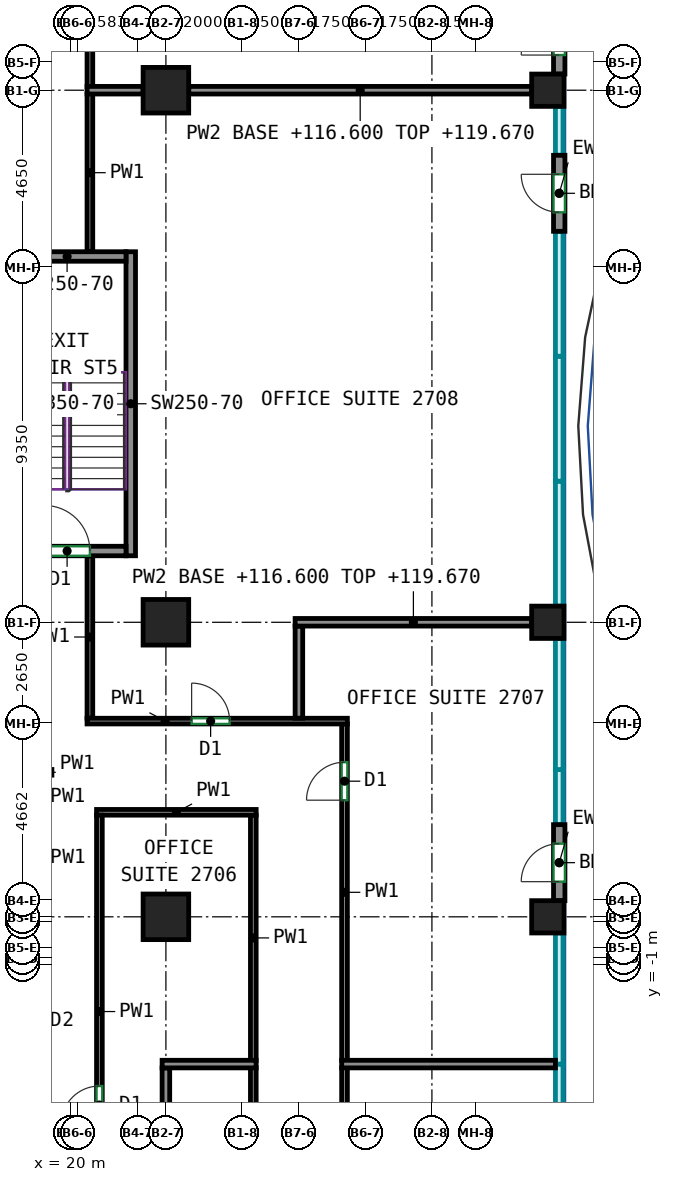
"""IFC4 building model, lengths in metres.
Left out: names, types, materials, properties, quantities, classifications, styles, units other than length and angle.
Written with IfcOpenShell. Run it as: python <this file> out.ifc"""

import sys

from ifc_helpers import new_model, si_unit, direction, frame, frame_2d, origin, origin_2d, place, context, subcontext, project, spatial, rectangle, extrude, source, transform, mapped, element, fill, save


model = new_model("IFC4")
c1 = context("Model", 3, precision=1e-05, world=origin(), true_north=direction((0.0, 1.0)))
c2 = subcontext(c1, "Body", "Model", "MODEL_VIEW")
j1 = project(units=[si_unit("LENGTHUNIT", "METRE"), si_unit("PLANEANGLEUNIT", "RADIAN")], contexts=[c1])
p1 = place(None, origin())
s1 = spatial("IfcSite", under=j1, at=p1, CompositionType="ELEMENT")
p2 = place(p1, origin())
s2 = spatial("IfcBuilding", under=s1, at=p2, CompositionType="ELEMENT")
p3 = place(p2, frame((0.0, 0.0, 116.6)))
s3 = spatial("IfcBuildingStorey", under=s2, at=p3, CompositionType="ELEMENT", Elevation=116.6)
m1 = source(origin(), c2, "Body", "SweptSolid", [
    extrude(rectangle(XDim=1.2, YDim=1.2, at=origin_2d()), origin(), (0.0, 0.0, 1.0), 3.72),
])
for number, where, z_axis, x_axis in (
    (1, (22.5, 0.25, 0.0), (0.0, 0.0, 1.0), (1.0, 0.0, 0.0)),
    (2, (22.5, 8.0, 0.0), (0.0, 0.0, 1.0), (1.0, 0.0, 0.0)),
    (3, (22.5, 22.0, 0.0), (0.0, 0.0, 1.0), (1.0, 0.0, 0.0)),
):
    element("IfcColumn", number, at=place(p3, frame(where, z_axis=z_axis, x_axis=x_axis)), inside=s3, PredefinedType="COLUMN", context=c2, shape_type="MappedRepresentation", body=[
        mapped(m1, transform((0.0, 0.0, 0.0))),
    ])
m2 = source(origin(), c2, "Body", "SweptSolid", [
    extrude(rectangle(XDim=0.85, YDim=0.85, at=origin_2d()), origin(), (0.0, 0.0, 1.0), 3.72),
])
for number, where, z_axis, x_axis in (
    (4, (32.55, 0.25, 0.0), (0.0, 0.0, 1.0), (1.0, 0.0, 0.0)),
    (5, (32.55, 8.0, 0.0), (0.0, 0.0, 1.0), (1.0, 0.0, 0.0)),
    (6, (32.55, 22.0, 0.0), (0.0, 0.0, 1.0), (1.0, 0.0, 0.0)),
):
    element("IfcColumn", number, at=place(p3, frame(where, z_axis=z_axis, x_axis=x_axis)), inside=s3, PredefinedType="COLUMN", context=c2, shape_type="MappedRepresentation", body=[
        mapped(m2, transform((0.0, 0.0, 0.0))),
    ])
m3 = source(origin(), c2, "Body", "SweptSolid", [
    extrude(rectangle(XDim=8.0, YDim=0.25, at=frame_2d((4.0, 0.0))), origin(), (0.0, 0.0, 1.0), 3.72),
])
p4 = place(p3, frame((21.575, 9.75, 0.0), z_axis=(0.0, 0.0, 1.0), x_axis=(0.0, 1.0, 0.0)))
e7 = element("IfcWall", 7, at=p4, inside=s3, PredefinedType="SHEAR", context=c2, shape_type="MappedRepresentation", body=[
    mapped(m3, transform((0.0, 0.0, 0.0))),
])
m4 = source(origin(), c2, "Body", "SweptSolid", [
    extrude(rectangle(XDim=3.1, YDim=0.25, at=frame_2d((1.55, 0.0))), origin(), (0.0, 0.0, 1.0), 3.72),
])
p5 = place(p3, frame((18.35, 9.875, 0.0), z_axis=(0.0, 0.0, 1.0), x_axis=(1.0, 0.0, 0.0)))
e8 = element("IfcWall", 8, at=p5, inside=s3, PredefinedType="SHEAR", context=c2, shape_type="MappedRepresentation", body=[
    mapped(m4, transform((0.0, 0.0, 0.0))),
])
p6 = place(p5, frame((0.95, 0.0, 0.0)))
e9 = element("IfcOpeningElement", 9, at=p6, cuts=e8, PredefinedType="OPENING", context=c2, shape_type="SweptSolid", body=[
    extrude(rectangle(XDim=1.2, YDim=2.1, at=frame_2d((0.6, 1.05))), frame((0.0, 0.135, 0.0), z_axis=(0.0, -1.0, 0.0), x_axis=(1.0, 0.0, 0.0)), (0.0, 0.0, 1.0), 0.27),
])
p7 = place(p3, frame((18.35, 17.625, 0.0), z_axis=(0.0, 0.0, 1.0), x_axis=(1.0, 0.0, 0.0)))
e10 = element("IfcWall", 10, at=p7, inside=s3, PredefinedType="SHEAR", context=c2, shape_type="MappedRepresentation", body=[
    mapped(m4, transform((0.0, 0.0, 0.0))),
])
m5 = source(origin(), c2, "Body", "SweptSolid", [
    extrude(rectangle(XDim=2.0, YDim=0.3, at=frame_2d((1.0, 0.0))), origin(), (0.0, 0.0, 1.0), 3.72),
])
p8 = place(p3, frame((32.85, 0.675, 0.0), z_axis=(0.0, 0.0, 1.0), x_axis=(0.0, 1.0, 0.0)))
e11 = element("IfcWall", 11, at=p8, inside=s3, PredefinedType="SOLIDWALL", context=c2, shape_type="MappedRepresentation", body=[
    mapped(m5, transform((0.0, 0.0, 0.0))),
])
p9 = place(p8, frame((0.5, 0.0, 0.0)))
e12 = element("IfcOpeningElement", 12, at=p9, cuts=e11, PredefinedType="OPENING", context=c2, shape_type="SweptSolid", body=[
    extrude(rectangle(XDim=1.0, YDim=2.1, at=frame_2d((0.5, 1.05))), frame((0.0, 0.16, 0.0), z_axis=(0.0, -1.0, 0.0), x_axis=(1.0, 0.0, 0.0)), (0.0, 0.0, 1.0), 0.32),
])
p10 = place(p3, frame((32.85, 18.288, 0.0), z_axis=(0.0, 0.0, 1.0), x_axis=(0.0, 1.0, 0.0)))
e13 = element("IfcWall", 13, at=p10, inside=s3, PredefinedType="SOLIDWALL", context=c2, shape_type="MappedRepresentation", body=[
    mapped(m5, transform((0.0, 0.0, 0.0))),
])
p11 = place(p10, frame((0.5, 0.0, 0.0)))
e14 = element("IfcOpeningElement", 14, at=p11, cuts=e13, PredefinedType="OPENING", context=c2, shape_type="SweptSolid", body=[
    extrude(rectangle(XDim=1.0, YDim=2.1, at=frame_2d((0.5, 1.05))), frame((0.0, 0.16, 0.0), z_axis=(0.0, -1.0, 0.0), x_axis=(1.0, 0.0, 0.0)), (0.0, 0.0, 1.0), 0.32),
])
p12 = place(p3, frame((32.85, 22.425, 0.0), z_axis=(0.0, 0.0, 1.0), x_axis=(0.0, 1.0, 0.0)))
e15 = element("IfcWall", 15, at=p12, inside=s3, PredefinedType="SOLIDWALL", context=c2, shape_type="MappedRepresentation", body=[
    mapped(m5, transform((0.0, 0.0, 0.0))),
])
p13 = place(p12, frame((0.5, 0.0, 0.0)))
e16 = element("IfcOpeningElement", 16, at=p13, cuts=e15, PredefinedType="OPENING", context=c2, shape_type="SweptSolid", body=[
    extrude(rectangle(XDim=1.0, YDim=2.1, at=frame_2d((0.5, 1.05))), frame((0.0, 0.16, 0.0), z_axis=(0.0, -1.0, 0.0), x_axis=(1.0, 0.0, 0.0)), (0.0, 0.0, 1.0), 0.32),
])
p14 = place(p3, frame((27.2, -19.175, 0.0), z_axis=(0.0, 0.0, 1.0), x_axis=(0.0, 1.0, 0.0)))
e17 = element("IfcWall", 17, at=p14, inside=s3, PredefinedType="PARTITIONING", context=c2, shape_type="SweptSolid", body=[
    extrude(rectangle(XDim=15.46, YDim=0.15, at=frame_2d((7.73, 0.0))), origin(), (0.0, 0.0, 1.0), 3.72),
])
p15 = place(p14, frame((3.514, 0.0, 0.0)))
e18 = element("IfcOpeningElement", 18, at=p15, cuts=e17, PredefinedType="OPENING", context=c2, shape_type="SweptSolid", body=[
    extrude(rectangle(XDim=1.0, YDim=2.1, at=frame_2d((0.5, 1.05))), frame((0.0, 0.085, 0.0), z_axis=(0.0, -1.0, 0.0), x_axis=(1.0, 0.0, 0.0)), (0.0, 0.0, 1.0), 0.17),
])
p16 = place(p3, frame((24.8, -11.285, 0.0), z_axis=(0.0, 0.0, 1.0), x_axis=(0.0, 1.0, 0.0)))
e19 = element("IfcWall", 19, at=p16, inside=s3, PredefinedType="PARTITIONING", context=c2, shape_type="SweptSolid", body=[
    extrude(rectangle(XDim=7.57, YDim=0.15, at=frame_2d((3.785, 0.0))), origin(), (0.0, 0.0, 1.0), 3.72),
])
p17 = place(p16, frame((5.054, 0.0, 0.0)))
e20 = element("IfcOpeningElement", 20, at=p17, cuts=e19, PredefinedType="OPENING", context=c2, shape_type="SweptSolid", body=[
    extrude(rectangle(XDim=0.9, YDim=2.1, at=frame_2d((0.45, 1.05))), frame((0.0, 0.085, 0.0), z_axis=(0.0, -1.0, 0.0), x_axis=(1.0, 0.0, 0.0)), (0.0, 0.0, 1.0), 0.17),
])
p18 = place(p3, frame((24.8, -3.535, 0.0), z_axis=(0.0, 0.0, 1.0), x_axis=(0.0, 1.0, 0.0)))
e21 = element("IfcWall", 21, at=p18, inside=s3, PredefinedType="PARTITIONING", context=c2, shape_type="SweptSolid", body=[
    extrude(rectangle(XDim=6.46, YDim=0.15, at=frame_2d((3.23, 0.0))), origin(), (0.0, 0.0, 1.0), 3.72),
])
p19 = place(p3, frame((20.675, 3.0, 0.0), z_axis=(0.0, 0.0, 1.0), x_axis=(1.0, 0.0, 0.0)))
e22 = element("IfcWall", 22, at=p19, inside=s3, PredefinedType="PARTITIONING", context=c2, shape_type="SweptSolid", body=[
    extrude(rectangle(XDim=4.2, YDim=0.15, at=frame_2d((2.1, 0.0))), origin(), (0.0, 0.0, 1.0), 3.72),
])
p20 = place(p3, frame((20.75, -7.41, 0.0), z_axis=(0.0, 0.0, 1.0), x_axis=(0.0, 1.0, 0.0)))
e23 = element("IfcWall", 23, at=p20, inside=s3, PredefinedType="PARTITIONING", context=c2, shape_type="SweptSolid", body=[
    extrude(rectangle(XDim=10.335, YDim=0.15, at=frame_2d((5.167, 0.0))), origin(), (0.0, 0.0, 1.0), 3.72),
])
p21 = place(p20, frame((2.208, 0.0, 0.0)))
e24 = element("IfcOpeningElement", 24, at=p21, cuts=e23, PredefinedType="OPENING", context=c2, shape_type="SweptSolid", body=[
    extrude(rectangle(XDim=1.0, YDim=2.1, at=frame_2d((0.5, 1.05))), frame((0.0, 0.085, 0.0), z_axis=(0.0, -1.0, 0.0), x_axis=(1.0, 0.0, 0.0)), (0.0, 0.0, 1.0), 0.17),
])
p22 = place(p3, frame((27.2, -3.535, 0.0), z_axis=(0.0, 0.0, 1.0), x_axis=(0.0, 1.0, 0.0)))
e25 = element("IfcWall", 25, at=p22, inside=s3, PredefinedType="PARTITIONING", context=c2, shape_type="SweptSolid", body=[
    extrude(rectangle(XDim=8.86, YDim=0.15, at=frame_2d((4.43, 0.0))), origin(), (0.0, 0.0, 1.0), 3.72),
])
p23 = place(p22, frame((6.854, 0.0, 0.0)))
e26 = element("IfcOpeningElement", 26, at=p23, cuts=e25, PredefinedType="OPENING", context=c2, shape_type="SweptSolid", body=[
    extrude(rectangle(XDim=1.0, YDim=2.1, at=frame_2d((0.5, 1.05))), frame((0.0, 0.085, 0.0), z_axis=(0.0, -1.0, 0.0), x_axis=(1.0, 0.0, 0.0)), (0.0, 0.0, 1.0), 0.17),
])
p24 = place(p3, frame((20.5, 17.75, 0.0), z_axis=(0.0, 0.0, 1.0), x_axis=(0.0, 1.0, 0.0)))
e27 = element("IfcWall", 27, at=p24, inside=s3, PredefinedType="PARTITIONING", context=c2, shape_type="SweptSolid", body=[
    extrude(rectangle(XDim=4.16, YDim=0.15, at=frame_2d((2.08, 0.0))), origin(), (0.0, 0.0, 1.0), 3.72),
])
p25 = place(p3, frame((20.5, 5.475, 0.0), z_axis=(0.0, 0.0, 1.0), x_axis=(0.0, 1.0, 0.0)))
e28 = element("IfcWall", 28, at=p25, inside=s3, PredefinedType="PARTITIONING", context=c2, shape_type="SweptSolid", body=[
    extrude(rectangle(XDim=4.275, YDim=0.15, at=frame_2d((2.137, 0.0))), origin(), (0.0, 0.0, 1.0), 3.72),
])
p26 = place(p3, frame((20.425, 5.4, 0.0), z_axis=(0.0, 0.0, 1.0), x_axis=(1.0, 0.0, 0.0)))
e29 = element("IfcWall", 29, at=p26, inside=s3, PredefinedType="PARTITIONING", context=c2, shape_type="SweptSolid", body=[
    extrude(rectangle(XDim=6.85, YDim=0.15, at=frame_2d((3.425, 0.0))), origin(), (0.0, 0.0, 1.0), 3.72),
])
p27 = place(p26, frame((2.752, 0.0, 0.0)))
e30 = element("IfcOpeningElement", 30, at=p27, cuts=e29, PredefinedType="OPENING", context=c2, shape_type="SweptSolid", body=[
    extrude(rectangle(XDim=1.0, YDim=2.1, at=frame_2d((0.5, 1.05))), frame((0.0, 0.085, 0.0), z_axis=(0.0, -1.0, 0.0), x_axis=(1.0, 0.0, 0.0)), (0.0, 0.0, 1.0), 0.17),
])
p28 = place(p3, frame((20.5, 22.09, 0.0), z_axis=(0.0, 0.0, 1.0), x_axis=(0.0, 1.0, 0.0)))
e31 = element("IfcWall", 31, at=p28, inside=s3, PredefinedType="PARTITIONING", context=c2, shape_type="SweptSolid", body=[
    extrude(rectangle(XDim=3.035, YDim=0.15, at=frame_2d((1.518, 0.0))), origin(), (0.0, 0.0, 1.0), 3.72),
])
p29 = place(p3, frame((27.126, -3.625, 0.0), z_axis=(0.0, 0.0, 1.0), x_axis=(1.0, 0.0, 0.0)))
e32 = element("IfcWall", 32, at=p29, inside=s3, PredefinedType="PARTITIONING", context=c2, shape_type="SweptSolid", body=[
    extrude(rectangle(XDim=5.624, YDim=0.2, at=frame_2d((2.812, 0.0))), origin(), (0.0, 0.0, 1.0), 3.72),
])
p30 = place(p3, frame((22.5, -3.725, 0.0), z_axis=(0.0, 0.0, 1.0), x_axis=(0.0, -1.0, 0.0)))
e33 = element("IfcWall", 33, at=p30, inside=s3, PredefinedType="PARTITIONING", context=c2, shape_type="SweptSolid", body=[
    extrude(rectangle(XDim=3.675, YDim=0.2, at=frame_2d((1.837, 0.0))), origin(), (0.0, 0.0, 1.0), 3.07),
])
p31 = place(p3, frame((22.4, -3.625, 0.0), z_axis=(0.0, 0.0, 1.0), x_axis=(1.0, 0.0, 0.0)))
e34 = element("IfcWall", 34, at=p31, inside=s3, PredefinedType="PARTITIONING", context=c2, shape_type="SweptSolid", body=[
    extrude(rectangle(XDim=2.474, YDim=0.2, at=frame_2d((1.237, 0.0))), origin(), (0.0, 0.0, 1.0), 3.72),
])
p32 = place(p3, frame((26.0, 5.476, 0.0), z_axis=(0.0, 0.0, 1.0), x_axis=(0.0, 1.0, 0.0)))
e35 = element("IfcWall", 35, at=p32, inside=s3, PredefinedType="PARTITIONING", context=c2, shape_type="SweptSolid", body=[
    extrude(rectangle(XDim=2.424, YDim=0.2, at=frame_2d((1.212, 0.0))), origin(), (0.0, 0.0, 1.0), 3.72),
])
p33 = place(p3, frame((25.9, 8.0, 0.0), z_axis=(0.0, 0.0, 1.0), x_axis=(1.0, 0.0, 0.0)))
e36 = element("IfcWall", 36, at=p33, inside=s3, PredefinedType="PARTITIONING", context=c2, shape_type="SweptSolid", body=[
    extrude(rectangle(XDim=6.225, YDim=0.2, at=frame_2d((3.113, 0.0))), origin(), (0.0, 0.0, 1.0), 3.07),
])
p34 = place(p3, frame((20.426, 22.0, 0.0), z_axis=(0.0, 0.0, 1.0), x_axis=(1.0, 0.0, 0.0)))
e37 = element("IfcWall", 37, at=p34, inside=s3, PredefinedType="PARTITIONING", context=c2, shape_type="SweptSolid", body=[
    extrude(rectangle(XDim=1.474, YDim=0.2, at=frame_2d((0.737, 0.0))), origin(), (0.0, 0.0, 1.0), 3.72),
])
p35 = place(p3, frame((23.1, 22.0, 0.0), z_axis=(0.0, 0.0, 1.0), x_axis=(1.0, 0.0, 0.0)))
e38 = element("IfcWall", 38, at=p35, inside=s3, PredefinedType="PARTITIONING", context=c2, shape_type="SweptSolid", body=[
    extrude(rectangle(XDim=9.025, YDim=0.2, at=frame_2d((4.512, 0.0))), origin(), (0.0, 0.0, 1.0), 3.07),
])
p36 = place(p9, origin())
e39 = element("IfcDoor", 39, at=p36, inside=s3, OperationType="SINGLE_SWING_LEFT", PredefinedType="DOOR", context=c2, shape_type="SweptSolid", body=[
    extrude(rectangle(XDim=1.0, YDim=2.1, at=frame_2d((0.5, 1.05))), frame((0.0, 0.025, 0.0), z_axis=(0.0, -1.0, 0.0), x_axis=(1.0, 0.0, 0.0)), (0.0, 0.0, 1.0), 0.05),
])
fill(e12, e39)
p37 = place(p11, origin())
e40 = element("IfcDoor", 40, at=p37, inside=s3, OperationType="SINGLE_SWING_RIGHT", PredefinedType="DOOR", context=c2, shape_type="SweptSolid", body=[
    extrude(rectangle(XDim=1.0, YDim=2.1, at=frame_2d((0.5, 1.05))), frame((0.0, 0.025, 0.0), z_axis=(0.0, -1.0, 0.0), x_axis=(1.0, 0.0, 0.0)), (0.0, 0.0, 1.0), 0.05),
])
fill(e14, e40)
p38 = place(p13, origin())
e41 = element("IfcDoor", 41, at=p38, inside=s3, OperationType="SINGLE_SWING_LEFT", PredefinedType="DOOR", context=c2, shape_type="SweptSolid", body=[
    extrude(rectangle(XDim=1.0, YDim=2.1, at=frame_2d((0.5, 1.05))), frame((0.0, 0.025, 0.0), z_axis=(0.0, -1.0, 0.0), x_axis=(1.0, 0.0, 0.0)), (0.0, 0.0, 1.0), 0.05),
])
fill(e16, e41)
p39 = place(p6, origin())
e42 = element("IfcDoor", 42, at=p39, inside=s3, OperationType="DOUBLE_DOOR_SINGLE_SWING", PredefinedType="DOOR", context=c2, shape_type="SweptSolid", body=[
    extrude(rectangle(XDim=1.2, YDim=2.1, at=frame_2d((0.6, 1.05))), frame((0.0, 0.025, 0.0), z_axis=(0.0, -1.0, 0.0), x_axis=(1.0, 0.0, 0.0)), (0.0, 0.0, 1.0), 0.05),
])
fill(e9, e42)
p40 = place(p21, origin())
e43 = element("IfcDoor", 43, at=p40, inside=s3, OperationType="SINGLE_SWING_LEFT", PredefinedType="DOOR", context=c2, shape_type="SweptSolid", body=[
    extrude(rectangle(XDim=1.0, YDim=2.1, at=frame_2d((0.5, 1.05))), frame((0.0, 0.025, 0.0), z_axis=(0.0, -1.0, 0.0), x_axis=(1.0, 0.0, 0.0)), (0.0, 0.0, 1.0), 0.05),
])
fill(e24, e43)
p41 = place(p23, origin())
e44 = element("IfcDoor", 44, at=p41, inside=s3, OperationType="SINGLE_SWING_LEFT", PredefinedType="DOOR", context=c2, shape_type="SweptSolid", body=[
    extrude(rectangle(XDim=1.0, YDim=2.1, at=frame_2d((0.5, 1.05))), frame((0.0, 0.025, 0.0), z_axis=(0.0, -1.0, 0.0), x_axis=(1.0, 0.0, 0.0)), (0.0, 0.0, 1.0), 0.05),
])
fill(e26, e44)
p42 = place(p27, origin())
e45 = element("IfcDoor", 45, at=p42, inside=s3, OperationType="SINGLE_SWING_LEFT", PredefinedType="DOOR", context=c2, shape_type="SweptSolid", body=[
    extrude(rectangle(XDim=1.0, YDim=2.1, at=frame_2d((0.5, 1.05))), frame((0.0, 0.025, 0.0), z_axis=(0.0, -1.0, 0.0), x_axis=(1.0, 0.0, 0.0)), (0.0, 0.0, 1.0), 0.05),
])
fill(e30, e45)
save(model, sys.argv[1])
